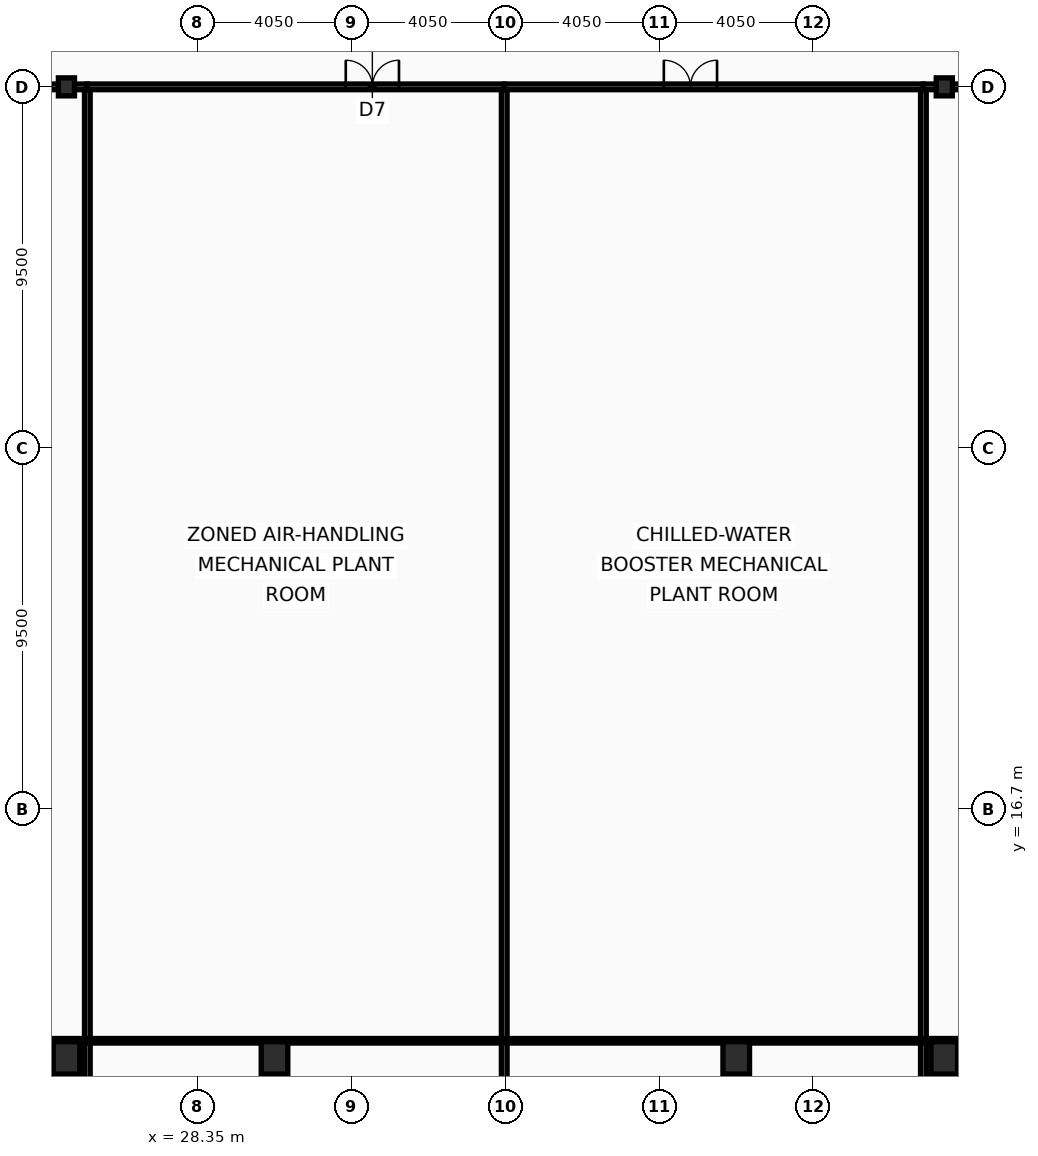
"""IFC4 building model, lengths in metres.
Left out: names, types, materials, properties, quantities, classifications, styles, units other than length and angle.
Written with IfcOpenShell. Run it as: python <this file> out.ifc"""

import sys

from ifc_helpers import new_model, si_unit, direction, frame, frame_2d, origin, origin_2d, place, context, subcontext, project, spatial, rectangle, hollow_rectangle, i_section, extrude, element, fill, save


model = new_model("IFC4")
c1 = context("Model", 3, precision=1e-05, world=origin(), true_north=direction((0.0, 1.0)))
c2 = subcontext(c1, "Body", "Model", "MODEL_VIEW")
j1 = project(units=[si_unit("LENGTHUNIT", "METRE"), si_unit("PLANEANGLEUNIT", "RADIAN")], contexts=[c1])
p1 = place(None, origin())
s1 = spatial("IfcSite", under=j1, at=p1, CompositionType="ELEMENT")
p2 = place(p1, origin())
s2 = spatial("IfcBuilding", under=s1, at=p2, CompositionType="ELEMENT")
p3 = place(p2, frame((0.0, 0.0, 85.8)))
s3 = spatial("IfcBuildingStorey", under=s2, at=p3, CompositionType="ELEMENT", Elevation=85.8)
for number, where, z_axis, x_axis in (
    (1, (24.9, 10.15, 0.0), (0.0, 0.0, 1.0), (1.0, 0.0, 0.0)),
    (2, (30.375, 10.15, 0.0), (0.0, 0.0, 1.0), (1.0, 0.0, 0.0)),
    (3, (42.525, 10.15, 0.0), (0.0, 0.0, 1.0), (1.0, 0.0, 0.0)),
    (4, (48.0, 10.15, 0.0), (0.0, 0.0, 1.0), (1.0, 0.0, 0.0)),
):
    element("IfcColumn", number, at=place(p3, frame(where, z_axis=z_axis, x_axis=x_axis)), inside=s3, PredefinedType="COLUMN", context=c2, shape_type="SweptSolid", body=[
        extrude(hollow_rectangle(XDim=0.7, YDim=0.85, WallThickness=0.05, at=origin_2d()), origin(), (0.0, 0.0, 1.0), 4.8),
    ])
for number, where, z_axis, x_axis in (
    (5, (24.9, 35.7, 0.0), (0.0, 0.0, 1.0), (1.0, 0.0, 0.0)),
    (6, (48.0, 35.7, 0.0), (0.0, 0.0, 1.0), (1.0, 0.0, 0.0)),
):
    element("IfcColumn", number, at=place(p3, frame(where, z_axis=z_axis, x_axis=x_axis)), inside=s3, PredefinedType="COLUMN", context=c2, shape_type="SweptSolid", body=[
        extrude(i_section(OverallWidth=0.424, OverallDepth=0.474, WebThickness=0.048, FlangeThickness=0.077, at=origin_2d()), origin(), (0.0, 0.0, 1.0), 4.8),
    ])
p4 = place(p3, frame((21.05, 35.7, 0.0), z_axis=(0.0, 0.0, 1.0), x_axis=(1.0, 0.0, 0.0)))
e7 = element("IfcWall", 7, at=p4, inside=s3, PredefinedType="PARTITIONING", context=c2, shape_type="SweptSolid", body=[
    extrude(rectangle(XDim=4.4, YDim=0.15, at=frame_2d((2.2, 0.0))), origin(), (0.0, 0.0, 1.0), 3.81),
])
p5 = place(p3, frame((25.45, 35.7, 0.0), z_axis=(0.0, 0.0, 1.0), x_axis=(1.0, 0.0, 0.0)))
e8 = element("IfcWall", 8, at=p5, inside=s3, PredefinedType="PARTITIONING", context=c2, shape_type="SweptSolid", body=[
    extrude(rectangle(XDim=10.97, YDim=0.15, at=frame_2d((5.485, 0.0))), origin(), (0.0, 0.0, 1.0), 3.81),
])
p6 = place(p5, frame((6.8, 0.0, 0.0)))
e9 = element("IfcOpeningElement", 9, at=p6, cuts=e8, PredefinedType="OPENING", context=c2, shape_type="SweptSolid", body=[
    extrude(rectangle(XDim=1.4, YDim=2.15, at=frame_2d((0.7, 1.075))), frame((0.0, 0.085, 0.0), z_axis=(0.0, -1.0, 0.0), x_axis=(1.0, 0.0, 0.0)), (0.0, 0.0, 1.0), 0.17),
])
p7 = place(p3, frame((36.42, 35.7, 0.0), z_axis=(0.0, 0.0, 1.0), x_axis=(1.0, 0.0, 0.0)))
e10 = element("IfcWall", 10, at=p7, inside=s3, PredefinedType="PARTITIONING", context=c2, shape_type="SweptSolid", body=[
    extrude(rectangle(XDim=11.03, YDim=0.15, at=frame_2d((5.515, 0.0))), origin(), (0.0, 0.0, 1.0), 3.81),
])
p8 = place(p7, frame((4.2, 0.0, 0.0)))
e11 = element("IfcOpeningElement", 11, at=p8, cuts=e10, PredefinedType="OPENING", context=c2, shape_type="SweptSolid", body=[
    extrude(rectangle(XDim=1.4, YDim=2.15, at=frame_2d((0.7, 1.075))), frame((0.0, 0.085, 0.0), z_axis=(0.0, -1.0, 0.0), x_axis=(1.0, 0.0, 0.0)), (0.0, 0.0, 1.0), 0.17),
])
p9 = place(p3, frame((47.45, 35.7, 0.0), z_axis=(0.0, 0.0, 1.0), x_axis=(1.0, 0.0, 0.0)))
e12 = element("IfcWall", 12, at=p9, inside=s3, PredefinedType="PARTITIONING", context=c2, shape_type="SweptSolid", body=[
    extrude(rectangle(XDim=4.4, YDim=0.15, at=frame_2d((2.2, 0.0))), origin(), (0.0, 0.0, 1.0), 3.81),
])
p10 = place(p3, frame((36.42, 7.82, 0.0), z_axis=(0.0, 0.0, 1.0), x_axis=(0.0, 1.0, 0.0)))
e13 = element("IfcWall", 13, at=p10, inside=s3, PredefinedType="PARTITIONING", context=c2, shape_type="SweptSolid", body=[
    extrude(rectangle(XDim=27.8, YDim=0.15, at=frame_2d((13.9, 0.0))), origin(), (0.0, 0.0, 1.0), 3.96),
])
for number, where, z_axis, x_axis in (
    (14, (25.45, 7.82, 0.0), (0.0, 0.0, 1.0), (0.0, 1.0, 0.0)),
    (15, (47.45, 7.82, 0.0), (0.0, 0.0, 1.0), (0.0, 1.0, 0.0)),
):
    element("IfcWall", number, at=place(p3, frame(where, z_axis=z_axis, x_axis=x_axis)), inside=s3, PredefinedType="PARTITIONING", context=c2, shape_type="SweptSolid", body=[
        extrude(rectangle(XDim=27.8, YDim=0.15, at=frame_2d((13.9, 0.0))), origin(), (0.0, 0.0, 1.0), 3.81),
    ])
p11 = place(p3, frame((4.095, 10.6, 0.0), z_axis=(0.0, 0.0, 1.0), x_axis=(1.0, 0.0, 0.0)))
e16 = element("IfcWall", 16, at=p11, inside=s3, PredefinedType="PARTITIONING", context=c2, shape_type="SweptSolid", body=[
    extrude(rectangle(XDim=64.71, YDim=0.12, at=frame_2d((32.355, 0.0))), origin(), (0.0, 0.0, 1.0), 3.81),
])
p12 = place(p6, origin())
e17 = element("IfcDoor", 17, at=p12, inside=s3, OperationType="DOUBLE_DOOR_SINGLE_SWING", PredefinedType="DOOR", context=c2, shape_type="SweptSolid", body=[
    extrude(rectangle(XDim=1.4, YDim=2.15, at=frame_2d((0.7, 1.075))), frame((0.0, 0.025, 0.0), z_axis=(0.0, -1.0, 0.0), x_axis=(1.0, 0.0, 0.0)), (0.0, 0.0, 1.0), 0.05),
])
fill(e9, e17)
p13 = place(p8, origin())
e18 = element("IfcDoor", 18, at=p13, inside=s3, OperationType="DOUBLE_DOOR_SINGLE_SWING", PredefinedType="DOOR", context=c2, shape_type="SweptSolid", body=[
    extrude(rectangle(XDim=1.4, YDim=2.15, at=frame_2d((0.7, 1.075))), frame((0.0, 0.025, 0.0), z_axis=(0.0, -1.0, 0.0), x_axis=(1.0, 0.0, 0.0)), (0.0, 0.0, 1.0), 0.05),
])
fill(e11, e18)
save(model, sys.argv[1])
